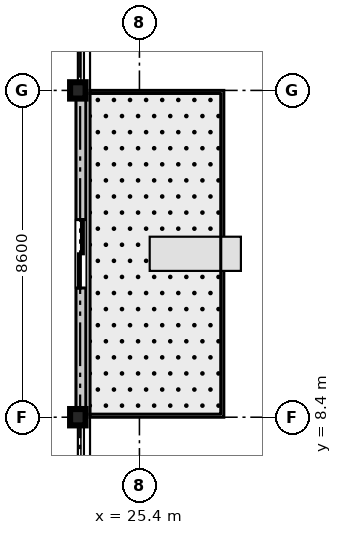
"""IFC4 building model, lengths in metres.
Left out: names, types, materials, properties, quantities, classifications, styles, units other than length and angle.
Written with IfcOpenShell. Run it as: python <this file> out.ifc"""

import sys

from ifc_helpers import new_model, si_unit, direction, frame, frame_2d, origin, origin_2d, place, context, subcontext, project, spatial, rectangle, i_section, extrude, source, transform, mapped, element, fill, save


model = new_model("IFC4")
c1 = context("Model", 3, precision=1e-05, world=origin(), true_north=direction((0.0, 1.0)))
c2 = subcontext(c1, "Body", "Model", "MODEL_VIEW")
j1 = project(units=[si_unit("LENGTHUNIT", "METRE"), si_unit("PLANEANGLEUNIT", "RADIAN")], contexts=[c1])
p1 = place(None, origin())
s1 = spatial("IfcSite", under=j1, at=p1, CompositionType="ELEMENT")
p2 = place(p1, origin())
s2 = spatial("IfcBuilding", under=s1, at=p2, CompositionType="ELEMENT")
p3 = place(p2, frame((0.0, 0.0, 117.5)))
s3 = spatial("IfcBuildingStorey", under=s2, at=p3, CompositionType="ELEMENT", Elevation=117.5)
m1 = source(origin(), c2, "Body", "SweptSolid", [
    extrude(i_section(OverallWidth=0.409, OverallDepth=0.43, WebThickness=0.021, FlangeThickness=0.034, at=origin_2d()), origin(), (0.0, 0.0, 1.0), 3.605),
])
for number, where, z_axis, x_axis in (
    (1, (23.78, 8.4, 0.0), (0.0, 0.0, 1.0), (1.0, 0.0, 0.0)),
    (2, (23.78, 17.0, 0.0), (0.0, 0.0, 1.0), (1.0, 0.0, 0.0)),
):
    element("IfcColumn", number, at=place(p3, frame(where, z_axis=z_axis, x_axis=x_axis)), inside=s3, PredefinedType="COLUMN", context=c2, shape_type="MappedRepresentation", body=[
        mapped(m1, transform((0.0, 0.0, 0.0), scale=1.0)),
    ])
m2 = source(origin(), c2, "Body", "SweptSolid", [
    extrude(rectangle(XDim=8.6, YDim=0.26, at=frame_2d((4.3, 0.0))), origin(), (0.0, 0.0, 1.0), 2.86),
])
p4 = place(p3, frame((23.86, 8.4, 0.0), z_axis=(0.0, 0.0, 1.0), x_axis=(0.0, 1.0, 0.0)))
e3 = element("IfcWall", 3, at=p4, inside=s3, PredefinedType="STANDARD", context=c2, shape_type="MappedRepresentation", body=[
    mapped(m2, transform((0.0, 0.0, 0.0), scale=1.0)),
])
p5 = place(p4, frame((3.4, 0.0, 0.0)))
e4 = element("IfcOpeningElement", 4, at=p5, cuts=e3, PredefinedType="OPENING", context=c2, shape_type="SweptSolid", body=[
    extrude(rectangle(XDim=1.8, YDim=2.25, at=frame_2d((0.9, 1.125))), frame((0.0, 0.14, 0.0), z_axis=(0.0, -1.0, 0.0), x_axis=(1.0, 0.0, 0.0)), (0.0, 0.0, 1.0), 0.28),
])
m3 = source(origin(), c2, "Body", "SweptSolid", [
    extrude(rectangle(XDim=1.8, YDim=2.25, at=frame_2d((0.9, 1.125))), frame((0.0, 0.025, 0.0), z_axis=(0.0, -1.0, 0.0), x_axis=(1.0, 0.0, 0.0)), (0.0, 0.0, 1.0), 0.05),
])
p6 = place(p5, frame((1.8, 0.0, 0.0), z_axis=(0.0, 0.0, 1.0), x_axis=(-1.0, 0.0, 0.0)))
e5 = element("IfcDoor", 5, at=p6, inside=s3, OperationType="DOUBLE_DOOR_SLIDING", PredefinedType="DOOR", context=c2, shape_type="MappedRepresentation", body=[
    mapped(m3, transform((0.0, 0.0, 0.0), scale=1.0)),
])
fill(e4, e5)
save(model, sys.argv[1])
